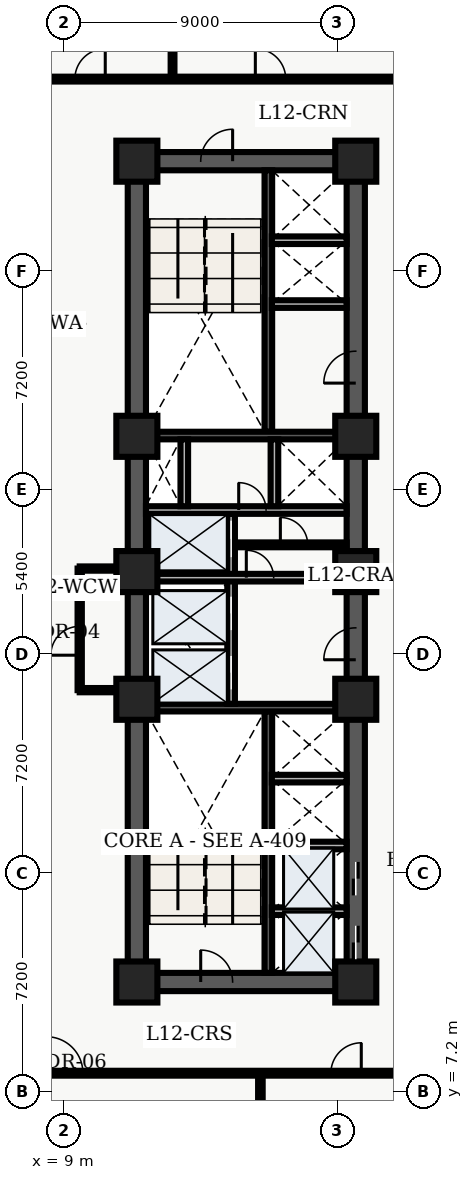
"""IFC4 building model, lengths in metres.
Left out: names, types, materials, properties, quantities, classifications, styles, units other than length and angle.
Written with IfcOpenShell. Run it as: python <this file> out.ifc"""

import sys

from ifc_helpers import new_model, entity, si_unit, converted_unit, direction, frame, origin_with_axes, origin_2d_with_axis, place, context, subcontext, project, spatial, polyline, rectangle, outline, extrude, element, fill, save


model = new_model("IFC4")
c1 = context("Model", 3, precision=1e-05, world=origin_with_axes(), true_north=direction((0.0, 1.0)))
c2 = subcontext(c1, "Body", "Model", "MODEL_VIEW")
j1 = project(units=[si_unit("LENGTHUNIT", "METRE"), converted_unit("PLANEANGLEUNIT", "DEGREE", entity("IfcPlaneAngleMeasure", 0.017), si_unit("PLANEANGLEUNIT", "RADIAN"), dimensions=[0, 0, 0, 0, 0, 0, 0])], contexts=[c1])
p1 = place(None, origin_with_axes())
s1 = spatial("IfcSite", under=j1, at=p1, CompositionType="ELEMENT")
p2 = place(p1, origin_with_axes())
s2 = spatial("IfcBuilding", under=s1, at=p2, CompositionType="ELEMENT")
p3 = place(p2, frame((0.0, 0.0, 52.2), z_axis=(0.0, 0.0, 1.0), x_axis=(1.0, 0.0, 0.0)))
s3 = spatial("IfcBuildingStorey", under=s2, at=p3, CompositionType="ELEMENT", Elevation=52.2)
p4 = place(p3, frame((11.4, 10.8, 0.0), z_axis=(0.0, 0.0, 1.0), x_axis=(0.0, 1.0, 0.0)))
e1 = element("IfcWall", 1, at=p4, inside=s3, PredefinedType="SHEAR", context=c2, shape_type="SweptSolid", body=[
    extrude(outline(polyline([(0.0, -0.3), (27.0, -0.3), (27.0, 0.3), (0.0, 0.3), (0.0, -0.3)])), origin_with_axes(), (0.0, 0.0, 1.0), 3.66),
])
p5 = place(p3, frame((11.4, 10.8, 0.0), z_axis=(0.0, 0.0, 1.0), x_axis=(1.0, 0.0, 0.0)))
e2 = element("IfcWall", 2, at=p5, inside=s3, PredefinedType="SHEAR", context=c2, shape_type="SweptSolid", body=[
    extrude(outline(polyline([(0.0, -0.3), (7.2, -0.3), (7.2, 0.3), (0.0, 0.3), (0.0, -0.3)])), origin_with_axes(), (0.0, 0.0, 1.0), 3.66),
])
p6 = place(p5, frame((2.625, 0.0, 0.0), z_axis=(0.0, 0.0, 1.0), x_axis=(1.0, 0.0, 0.0)))
e3 = element("IfcOpeningElement", 3, at=p6, cuts=e2, PredefinedType="OPENING", context=c2, shape_type="SweptSolid", body=[
    extrude(rectangle(XDim=1.05, YDim=0.62, at=origin_2d_with_axis()), origin_with_axes(), (0.0, 0.0, 1.0), 2.15),
])
p7 = place(p3, frame((11.4, 37.8, 0.0), z_axis=(0.0, 0.0, 1.0), x_axis=(1.0, 0.0, 0.0)))
e4 = element("IfcWall", 4, at=p7, inside=s3, PredefinedType="SHEAR", context=c2, shape_type="SweptSolid", body=[
    extrude(outline(polyline([(0.0, -0.3), (7.2, -0.3), (7.2, 0.3), (0.0, 0.3), (0.0, -0.3)])), origin_with_axes(), (0.0, 0.0, 1.0), 3.66),
])
p8 = place(p7, frame((2.625, 0.0, 0.0), z_axis=(0.0, 0.0, 1.0), x_axis=(1.0, 0.0, 0.0)))
e5 = element("IfcOpeningElement", 5, at=p8, cuts=e4, PredefinedType="OPENING", context=c2, shape_type="SweptSolid", body=[
    extrude(rectangle(XDim=1.05, YDim=0.62, at=origin_2d_with_axis()), origin_with_axes(), (0.0, 0.0, 1.0), 2.15),
])
p9 = place(p3, frame((18.6, 10.8, 0.0), z_axis=(0.0, 0.0, 1.0), x_axis=(0.0, 1.0, 0.0)))
e6 = element("IfcWall", 6, at=p9, inside=s3, PredefinedType="SHEAR", context=c2, shape_type="SweptSolid", body=[
    extrude(outline(polyline([(0.0, -0.3), (13.5, -0.3), (13.5, 0.3), (0.0, 0.3), (0.0, -0.3)])), origin_with_axes(), (0.0, 0.0, 1.0), 3.66),
])
p10 = place(p9, frame((1.3, 0.0, 0.0), z_axis=(0.0, 0.0, 1.0), x_axis=(1.0, 0.0, 0.0)))
e7 = element("IfcOpeningElement", 7, at=p10, cuts=e6, PredefinedType="OPENING", context=c2, shape_type="SweptSolid", body=[
    extrude(rectangle(XDim=1.1, YDim=0.62, at=origin_2d_with_axis()), origin_with_axes(), (0.0, 0.0, 1.0), 2.15),
])
p11 = place(p9, frame((3.4, 0.0, 0.0), z_axis=(0.0, 0.0, 1.0), x_axis=(1.0, 0.0, 0.0)))
e8 = element("IfcOpeningElement", 8, at=p11, cuts=e6, PredefinedType="OPENING", context=c2, shape_type="SweptSolid", body=[
    extrude(rectangle(XDim=1.1, YDim=0.62, at=origin_2d_with_axis()), origin_with_axes(), (0.0, 0.0, 1.0), 2.15),
])
p12 = place(p9, frame((11.125, 0.0, 0.0), z_axis=(0.0, 0.0, 1.0), x_axis=(1.0, 0.0, 0.0)))
e9 = element("IfcOpeningElement", 9, at=p12, cuts=e6, PredefinedType="OPENING", context=c2, shape_type="SweptSolid", body=[
    extrude(rectangle(XDim=1.05, YDim=0.62, at=origin_2d_with_axis()), origin_with_axes(), (0.0, 0.0, 1.0), 2.15),
])
p13 = place(p3, frame((18.6, 24.3, 0.0), z_axis=(0.0, 0.0, 1.0), x_axis=(0.0, 1.0, 0.0)))
e10 = element("IfcWall", 10, at=p13, inside=s3, PredefinedType="SHEAR", context=c2, shape_type="SweptSolid", body=[
    extrude(outline(polyline([(0.0, -0.3), (13.5, -0.3), (13.5, 0.3), (0.0, 0.3), (0.0, -0.3)])), origin_with_axes(), (0.0, 0.0, 1.0), 3.66),
])
p14 = place(p13, frame((6.725, 0.0, 0.0), z_axis=(0.0, 0.0, 1.0), x_axis=(1.0, 0.0, 0.0)))
e11 = element("IfcOpeningElement", 11, at=p14, cuts=e10, PredefinedType="OPENING", context=c2, shape_type="SweptSolid", body=[
    extrude(rectangle(XDim=1.05, YDim=0.62, at=origin_2d_with_axis()), origin_with_axes(), (0.0, 0.0, 1.0), 2.15),
])
p15 = place(p3, frame((15.725, 11.1, 0.0), z_axis=(0.0, 0.0, 1.0), x_axis=(0.0, 1.0, 0.0)))
e12 = element("IfcWall", 12, at=p15, inside=s3, PredefinedType="SHEAR", context=c2, shape_type="SweptSolid", body=[
    extrude(outline(polyline([(0.0, -0.125), (8.6, -0.125), (8.6, 0.125), (0.0, 0.125), (0.0, -0.125)])), origin_with_axes(), (0.0, 0.0, 1.0), 3.66),
])
p16 = place(p3, frame((11.7, 19.825, 0.0), z_axis=(0.0, 0.0, 1.0), x_axis=(1.0, 0.0, 0.0)))
e13 = element("IfcWall", 13, at=p16, inside=s3, PredefinedType="SHEAR", context=c2, shape_type="SweptSolid", body=[
    extrude(outline(polyline([(0.0, -0.125), (6.6, -0.125), (6.6, 0.125), (0.0, 0.125), (0.0, -0.125)])), origin_with_axes(), (0.0, 0.0, 1.0), 3.66),
])
p17 = place(p3, frame((15.725, 28.9, 0.0), z_axis=(0.0, 0.0, 1.0), x_axis=(0.0, 1.0, 0.0)))
e14 = element("IfcWall", 14, at=p17, inside=s3, PredefinedType="SHEAR", context=c2, shape_type="SweptSolid", body=[
    extrude(outline(polyline([(0.0, -0.125), (8.6, -0.125), (8.6, 0.125), (0.0, 0.125), (0.0, -0.125)])), origin_with_axes(), (0.0, 0.0, 1.0), 3.66),
])
p18 = place(p3, frame((11.7, 28.775, 0.0), z_axis=(0.0, 0.0, 1.0), x_axis=(1.0, 0.0, 0.0)))
e15 = element("IfcWall", 15, at=p18, inside=s3, PredefinedType="SHEAR", context=c2, shape_type="SweptSolid", body=[
    extrude(outline(polyline([(0.0, -0.125), (6.6, -0.125), (6.6, 0.125), (0.0, 0.125), (0.0, -0.125)])), origin_with_axes(), (0.0, 0.0, 1.0), 3.66),
])
p19 = place(p3, frame((14.5, 19.95, 0.0), z_axis=(0.0, 0.0, 1.0), x_axis=(0.0, 1.0, 0.0)))
e16 = element("IfcWall", 16, at=p19, inside=s3, PredefinedType="SOLIDWALL", context=c2, shape_type="SweptSolid", body=[
    extrude(outline(polyline([(0.0, -0.125), (6.25, -0.125), (6.25, 0.125), (0.0, 0.125), (0.0, -0.125)])), origin_with_axes(), (0.0, 0.0, 1.0), 2.7),
])
p20 = place(p19, frame((1.025, 0.0, 0.0), z_axis=(0.0, 0.0, 1.0), x_axis=(1.0, 0.0, 0.0)))
e17 = element("IfcOpeningElement", 17, at=p20, cuts=e16, PredefinedType="OPENING", context=c2, shape_type="SweptSolid", body=[
    extrude(rectangle(XDim=1.1, YDim=0.27, at=origin_2d_with_axis()), origin_with_axes(), (0.0, 0.0, 1.0), 2.15),
])
p21 = place(p19, frame((2.975, 0.0, 0.0), z_axis=(0.0, 0.0, 1.0), x_axis=(1.0, 0.0, 0.0)))
e18 = element("IfcOpeningElement", 18, at=p21, cuts=e16, PredefinedType="OPENING", context=c2, shape_type="SweptSolid", body=[
    extrude(rectangle(XDim=1.1, YDim=0.27, at=origin_2d_with_axis()), origin_with_axes(), (0.0, 0.0, 1.0), 2.15),
])
p22 = place(p19, frame((5.425, 0.0, 0.0), z_axis=(0.0, 0.0, 1.0), x_axis=(1.0, 0.0, 0.0)))
e19 = element("IfcOpeningElement", 19, at=p22, cuts=e16, PredefinedType="OPENING", context=c2, shape_type="SweptSolid", body=[
    extrude(rectangle(XDim=1.2, YDim=0.27, at=origin_2d_with_axis()), origin_with_axes(), (0.0, 0.0, 1.0), 2.15),
])
p23 = place(p3, frame((11.7, 24.1, 0.0), z_axis=(0.0, 0.0, 1.0), x_axis=(1.0, 0.0, 0.0)))
e20 = element("IfcWall", 20, at=p23, inside=s3, PredefinedType="SOLIDWALL", context=c2, shape_type="SweptSolid", body=[
    extrude(outline(polyline([(0.0, -0.125), (6.6, -0.125), (6.6, 0.125), (0.0, 0.125), (0.0, -0.125)])), origin_with_axes(), (0.0, 0.0, 1.0), 2.7),
])
p24 = place(p23, frame((3.75, 0.0, 0.0), z_axis=(0.0, 0.0, 1.0), x_axis=(1.0, 0.0, 0.0)))
e21 = element("IfcOpeningElement", 21, at=p24, cuts=e20, PredefinedType="OPENING", context=c2, shape_type="SweptSolid", body=[
    extrude(rectangle(XDim=0.9, YDim=0.27, at=origin_2d_with_axis()), origin_with_axes(), (0.0, 0.0, 1.0), 2.15),
])
p25 = place(p3, frame((11.7, 26.325, 0.0), z_axis=(0.0, 0.0, 1.0), x_axis=(1.0, 0.0, 0.0)))
e22 = element("IfcWall", 22, at=p25, inside=s3, PredefinedType="SOLIDWALL", context=c2, shape_type="SweptSolid", body=[
    extrude(outline(polyline([(0.0, -0.125), (6.6, -0.125), (6.6, 0.125), (0.0, 0.125), (0.0, -0.125)])), origin_with_axes(), (0.0, 0.0, 1.0), 2.7),
])
p26 = place(p25, frame((3.5, 0.0, 0.0), z_axis=(0.0, 0.0, 1.0), x_axis=(1.0, 0.0, 0.0)))
e23 = element("IfcOpeningElement", 23, at=p26, cuts=e22, PredefinedType="OPENING", context=c2, shape_type="SweptSolid", body=[
    extrude(rectangle(XDim=0.9, YDim=0.27, at=origin_2d_with_axis()), origin_with_axes(), (0.0, 0.0, 1.0), 2.15),
])
for number, where, z_axis, x_axis in (
    (24, (12.96, 26.45, 0.0), (0.0, 0.0, 1.0), (0.0, 1.0, 0.0)),
    (25, (15.925, 26.45, 0.0), (0.0, 0.0, 1.0), (0.0, 1.0, 0.0)),
):
    element("IfcWall", number, at=place(p3, frame(where, z_axis=z_axis, x_axis=x_axis)), inside=s3, PredefinedType="SOLIDWALL", context=c2, shape_type="SweptSolid", body=[
        extrude(outline(polyline([(0.0, -0.125), (2.2, -0.125), (2.2, 0.125), (0.0, 0.125), (0.0, -0.125)])), origin_with_axes(), (0.0, 0.0, 1.0), 2.7),
    ])
for number, where, z_axis, x_axis in (
    (26, (11.4, 10.8, 0.0), (0.0, 0.0, 1.0), (1.0, 0.0, 0.0)),
    (27, (11.4, 20.1, 0.0), (0.0, 0.0, 1.0), (1.0, 0.0, 0.0)),
    (28, (11.4, 24.3, 0.0), (0.0, 0.0, 1.0), (1.0, 0.0, 0.0)),
    (29, (11.4, 28.75, 0.0), (0.0, 0.0, 1.0), (1.0, 0.0, 0.0)),
    (30, (11.4, 37.8, 0.0), (0.0, 0.0, 1.0), (1.0, 0.0, 0.0)),
    (31, (18.6, 10.8, 0.0), (0.0, 0.0, 1.0), (1.0, 0.0, 0.0)),
    (32, (18.6, 20.1, 0.0), (0.0, 0.0, 1.0), (1.0, 0.0, 0.0)),
    (33, (18.6, 24.3, 0.0), (0.0, 0.0, 1.0), (1.0, 0.0, 0.0)),
    (34, (18.6, 28.75, 0.0), (0.0, 0.0, 1.0), (1.0, 0.0, 0.0)),
    (35, (18.6, 37.8, 0.0), (0.0, 0.0, 1.0), (1.0, 0.0, 0.0)),
):
    element("IfcColumn", number, at=place(p3, frame(where, z_axis=z_axis, x_axis=x_axis)), inside=s3, PredefinedType="COLUMN", context=c2, shape_type="SweptSolid", body=[
        extrude(rectangle(XDim=1.35, YDim=1.35, at=origin_2d_with_axis()), origin_with_axes(), (0.0, 0.0, 1.0), 3.9),
    ])
p27 = place(p3, frame((14.62, 25.18, 0.0), z_axis=(0.0, 0.0, 1.0), x_axis=(1.0, 0.0, 0.0)))
e36 = element("IfcWall", 36, at=p27, inside=s3, PredefinedType="PARTITIONING", context=c2, shape_type="SweptSolid", body=[
    extrude(outline(polyline([(0.0, -0.08), (3.68, -0.08), (3.68, 0.08), (0.0, 0.08), (0.0, -0.08)])), origin_with_axes(), (0.0, 0.0, 1.0), 2.7),
])
p28 = place(p27, frame((1.95, 0.0, 0.0), z_axis=(0.0, 0.0, 1.0), x_axis=(1.0, 0.0, 0.0)))
e37 = element("IfcOpeningElement", 37, at=p28, cuts=e36, PredefinedType="OPENING", context=c2, shape_type="SweptSolid", body=[
    extrude(rectangle(XDim=0.9, YDim=0.18, at=origin_2d_with_axis()), origin_with_axes(), (0.0, 0.0, 1.0), 2.15),
])
for number, where, z_axis, x_axis in (
    (38, (15.84, 13.13, 0.0), (0.0, 0.0, 1.0), (1.0, 0.0, 0.0)),
    (39, (15.84, 15.29, 0.0), (0.0, 0.0, 1.0), (1.0, 0.0, 0.0)),
    (40, (15.84, 17.49, 0.0), (0.0, 0.0, 1.0), (1.0, 0.0, 0.0)),
    (41, (15.84, 33.1, 0.0), (0.0, 0.0, 1.0), (1.0, 0.0, 0.0)),
    (42, (15.84, 35.2, 0.0), (0.0, 0.0, 1.0), (1.0, 0.0, 0.0)),
):
    element("IfcWall", number, at=place(p3, frame(where, z_axis=z_axis, x_axis=x_axis)), inside=s3, PredefinedType="SOLIDWALL", context=c2, shape_type="SweptSolid", body=[
        extrude(outline(polyline([(0.0, -0.125), (2.46, -0.125), (2.46, 0.125), (0.0, 0.125), (0.0, -0.125)])), origin_with_axes(), (0.0, 0.0, 1.0), 2.7),
    ])
p29 = place(p3, frame((9.52, 20.4, 0.0), z_axis=(0.0, 0.0, 1.0), x_axis=(0.0, 1.0, 0.0)))
e43 = element("IfcWall", 43, at=p29, inside=s3, PredefinedType="PARTITIONING", context=c2, shape_type="SweptSolid", body=[
    extrude(outline(polyline([(0.0, -0.07), (4.0, -0.07), (4.0, 0.07), (0.0, 0.07), (0.0, -0.07)])), origin_with_axes(), (0.0, 0.0, 1.0), 2.7),
])
p30 = place(p29, frame((1.625, 0.0, 0.0), z_axis=(0.0, 0.0, 1.0), x_axis=(1.0, 0.0, 0.0)))
e44 = element("IfcOpeningElement", 44, at=p30, cuts=e43, PredefinedType="OPENING", context=c2, shape_type="SweptSolid", body=[
    extrude(rectangle(XDim=0.95, YDim=0.16, at=origin_2d_with_axis()), origin_with_axes(), (0.0, 0.0, 1.0), 2.15),
])
for number, where, z_axis, x_axis in (
    (45, (9.52, 20.4, 0.0), (0.0, 0.0, 1.0), (1.0, 0.0, 0.0)),
    (46, (9.52, 24.4, 0.0), (0.0, 0.0, 1.0), (1.0, 0.0, 0.0)),
):
    element("IfcWall", number, at=place(p3, frame(where, z_axis=z_axis, x_axis=x_axis)), inside=s3, PredefinedType="PARTITIONING", context=c2, shape_type="SweptSolid", body=[
        extrude(outline(polyline([(0.0, -0.07), (1.58, -0.07), (1.58, 0.07), (0.0, 0.07), (0.0, -0.07)])), origin_with_axes(), (0.0, 0.0, 1.0), 2.7),
    ])
p31 = place(p3, frame((2.6, 7.8, 0.0), z_axis=(0.0, 0.0, 1.0), x_axis=(1.0, 0.0, 0.0)))
e47 = element("IfcWall", 47, at=p31, inside=s3, PredefinedType="PARTITIONING", context=c2, shape_type="SweptSolid", body=[
    extrude(outline(polyline([(0.0, -0.08), (18.55, -0.08), (18.55, 0.08), (0.0, 0.08), (0.0, -0.08)])), origin_with_axes(), (0.0, 0.0, 1.0), 2.7),
])
p32 = place(p31, frame((6.426, 0.0, 0.0), z_axis=(0.0, 0.0, 1.0), x_axis=(1.0, 0.0, 0.0)))
e48 = element("IfcOpeningElement", 48, at=p32, cuts=e47, PredefinedType="OPENING", context=c2, shape_type="SweptSolid", body=[
    extrude(rectangle(XDim=1.2, YDim=0.18, at=origin_2d_with_axis()), origin_with_axes(), (0.0, 0.0, 1.0), 2.2),
])
p33 = place(p31, frame((15.681, 0.0, 0.0), z_axis=(0.0, 0.0, 1.0), x_axis=(1.0, 0.0, 0.0)))
e49 = element("IfcOpeningElement", 49, at=p33, cuts=e47, PredefinedType="OPENING", context=c2, shape_type="SweptSolid", body=[
    extrude(rectangle(XDim=1.0, YDim=0.18, at=origin_2d_with_axis()), origin_with_axes(), (0.0, 0.0, 1.0), 2.15),
])
p34 = place(p3, frame((2.6, 40.5, 0.0), z_axis=(0.0, 0.0, 1.0), x_axis=(1.0, 0.0, 0.0)))
e50 = element("IfcWall", 50, at=p34, inside=s3, PredefinedType="PARTITIONING", context=c2, shape_type="SweptSolid", body=[
    extrude(outline(polyline([(0.0, -0.08), (18.65, -0.08), (18.65, 0.08), (0.0, 0.08), (0.0, -0.08)])), origin_with_axes(), (0.0, 0.0, 1.0), 2.7),
])
p35 = place(p34, frame((2.268, 0.0, 0.0), z_axis=(0.0, 0.0, 1.0), x_axis=(1.0, 0.0, 0.0)))
e51 = element("IfcOpeningElement", 51, at=p35, cuts=e50, PredefinedType="OPENING", context=c2, shape_type="SweptSolid", body=[
    extrude(rectangle(XDim=1.0, YDim=0.18, at=origin_2d_with_axis()), origin_with_axes(), (0.0, 0.0, 1.0), 2.15),
])
p36 = place(p34, frame((7.261, 0.0, 0.0), z_axis=(0.0, 0.0, 1.0), x_axis=(1.0, 0.0, 0.0)))
e52 = element("IfcOpeningElement", 52, at=p36, cuts=e50, PredefinedType="OPENING", context=c2, shape_type="SweptSolid", body=[
    extrude(rectangle(XDim=1.0, YDim=0.18, at=origin_2d_with_axis()), origin_with_axes(), (0.0, 0.0, 1.0), 2.15),
])
p37 = place(p34, frame((13.197, 0.0, 0.0), z_axis=(0.0, 0.0, 1.0), x_axis=(1.0, 0.0, 0.0)))
e53 = element("IfcOpeningElement", 53, at=p37, cuts=e50, PredefinedType="OPENING", context=c2, shape_type="SweptSolid", body=[
    extrude(rectangle(XDim=1.0, YDim=0.18, at=origin_2d_with_axis()), origin_with_axes(), (0.0, 0.0, 1.0), 2.15),
])
p38 = place(p3, frame((15.463, 0.36, 0.0), z_axis=(0.0, 0.0, 1.0), x_axis=(0.0, 1.0, 0.0)))
e54 = element("IfcWall", 54, at=p38, inside=s3, PredefinedType="PARTITIONING", context=c2, shape_type="SweptSolid", body=[
    extrude(outline(polyline([(0.0, -0.075), (7.34, -0.075), (7.34, 0.075), (0.0, 0.075), (0.0, -0.075)])), origin_with_axes(), (0.0, 0.0, 1.0), 2.7),
])
p39 = place(p3, frame((12.574, 40.6, 0.0), z_axis=(0.0, 0.0, 1.0), x_axis=(0.0, 1.0, 0.0)))
e55 = element("IfcWall", 55, at=p39, inside=s3, PredefinedType="PARTITIONING", context=c2, shape_type="SweptSolid", body=[
    extrude(outline(polyline([(0.0, -0.062), (7.64, -0.062), (7.64, 0.062), (0.0, 0.062), (0.0, -0.062)])), origin_with_axes(), (0.0, 0.0, 1.0), 2.7),
])
p40 = place(p9, frame((1.3, 0.0, 0.0), z_axis=(0.0, 0.0, 1.0), x_axis=(1.0, 0.0, 0.0)))
e56 = element("IfcDoor", 56, at=p40, inside=s3, OperationType="SLIDING_TO_LEFT", PredefinedType="DOOR", context=c2, shape_type="SweptSolid", body=[
    extrude(rectangle(XDim=1.1, YDim=0.09, at=origin_2d_with_axis()), origin_with_axes(), (0.0, 0.0, 1.0), 2.15),
])
fill(e7, e56)
p41 = place(p9, frame((3.4, 0.0, 0.0), z_axis=(0.0, 0.0, 1.0), x_axis=(1.0, 0.0, 0.0)))
e57 = element("IfcDoor", 57, at=p41, inside=s3, OperationType="SLIDING_TO_RIGHT", PredefinedType="DOOR", context=c2, shape_type="SweptSolid", body=[
    extrude(rectangle(XDim=1.1, YDim=0.09, at=origin_2d_with_axis()), origin_with_axes(), (0.0, 0.0, 1.0), 2.15),
])
fill(e8, e57)
p42 = place(p19, frame((1.025, 0.0, 0.0), z_axis=(0.0, 0.0, 1.0), x_axis=(1.0, 0.0, 0.0)))
e58 = element("IfcDoor", 58, at=p42, inside=s3, OperationType="SLIDING_TO_LEFT", PredefinedType="DOOR", context=c2, shape_type="SweptSolid", body=[
    extrude(rectangle(XDim=1.1, YDim=0.09, at=origin_2d_with_axis()), origin_with_axes(), (0.0, 0.0, 1.0), 2.15),
])
fill(e17, e58)
p43 = place(p19, frame((2.975, 0.0, 0.0), z_axis=(0.0, 0.0, 1.0), x_axis=(1.0, 0.0, 0.0)))
e59 = element("IfcDoor", 59, at=p43, inside=s3, OperationType="SLIDING_TO_RIGHT", PredefinedType="DOOR", context=c2, shape_type="SweptSolid", body=[
    extrude(rectangle(XDim=1.1, YDim=0.09, at=origin_2d_with_axis()), origin_with_axes(), (0.0, 0.0, 1.0), 2.15),
])
fill(e18, e59)
p44 = place(p19, frame((5.425, 0.0, 0.0), z_axis=(0.0, 0.0, 1.0), x_axis=(1.0, 0.0, 0.0)))
e60 = element("IfcDoor", 60, at=p44, inside=s3, OperationType="DOUBLE_DOOR_SLIDING", PredefinedType="DOOR", context=c2, shape_type="SweptSolid", body=[
    extrude(rectangle(XDim=1.2, YDim=0.09, at=origin_2d_with_axis()), origin_with_axes(), (0.0, 0.0, 1.0), 2.15),
])
fill(e19, e60)
p45 = place(p5, frame((2.625, 0.0, 0.0), z_axis=(0.0, 0.0, 1.0), x_axis=(1.0, 0.0, 0.0)))
e61 = element("IfcDoor", 61, at=p45, inside=s3, OperationType="SINGLE_SWING_LEFT", PredefinedType="DOOR", context=c2, shape_type="SweptSolid", body=[
    extrude(rectangle(XDim=1.05, YDim=0.09, at=origin_2d_with_axis()), origin_with_axes(), (0.0, 0.0, 1.0), 2.15),
])
fill(e3, e61)
p46 = place(p7, frame((2.625, 0.0, 0.0), z_axis=(0.0, 0.0, 1.0), x_axis=(1.0, 0.0, 0.0)))
e62 = element("IfcDoor", 62, at=p46, inside=s3, OperationType="SINGLE_SWING_RIGHT", PredefinedType="DOOR", context=c2, shape_type="SweptSolid", body=[
    extrude(rectangle(XDim=1.05, YDim=0.09, at=origin_2d_with_axis()), origin_with_axes(), (0.0, 0.0, 1.0), 2.15),
])
fill(e5, e62)
p47 = place(p9, frame((11.125, 0.0, 0.0), z_axis=(0.0, 0.0, 1.0), x_axis=(1.0, 0.0, 0.0)))
e63 = element("IfcDoor", 63, at=p47, inside=s3, OperationType="SINGLE_SWING_LEFT", PredefinedType="DOOR", context=c2, shape_type="SweptSolid", body=[
    extrude(rectangle(XDim=1.05, YDim=0.09, at=origin_2d_with_axis()), origin_with_axes(), (0.0, 0.0, 1.0), 2.15),
])
fill(e9, e63)
p48 = place(p25, frame((3.5, 0.0, 0.0), z_axis=(0.0, 0.0, 1.0), x_axis=(1.0, 0.0, 0.0)))
e64 = element("IfcDoor", 64, at=p48, inside=s3, OperationType="SINGLE_SWING_LEFT", PredefinedType="DOOR", context=c2, shape_type="SweptSolid", body=[
    extrude(rectangle(XDim=0.9, YDim=0.09, at=origin_2d_with_axis()), origin_with_axes(), (0.0, 0.0, 1.0), 2.15),
])
fill(e23, e64)
p49 = place(p23, frame((3.75, 0.0, 0.0), z_axis=(0.0, 0.0, 1.0), x_axis=(1.0, 0.0, 0.0)))
e65 = element("IfcDoor", 65, at=p49, inside=s3, OperationType="SINGLE_SWING_LEFT", PredefinedType="DOOR", context=c2, shape_type="SweptSolid", body=[
    extrude(rectangle(XDim=0.9, YDim=0.09, at=origin_2d_with_axis()), origin_with_axes(), (0.0, 0.0, 1.0), 2.15),
])
fill(e21, e65)
p50 = place(p27, frame((1.95, 0.0, 0.0), z_axis=(0.0, 0.0, 1.0), x_axis=(1.0, 0.0, 0.0)))
e66 = element("IfcDoor", 66, at=p50, inside=s3, OperationType="SINGLE_SWING_LEFT", PredefinedType="DOOR", context=c2, shape_type="SweptSolid", body=[
    extrude(rectangle(XDim=0.9, YDim=0.09, at=origin_2d_with_axis()), origin_with_axes(), (0.0, 0.0, 1.0), 2.15),
])
fill(e37, e66)
p51 = place(p13, frame((6.725, 0.0, 0.0), z_axis=(0.0, 0.0, 1.0), x_axis=(1.0, 0.0, 0.0)))
e67 = element("IfcDoor", 67, at=p51, inside=s3, OperationType="SINGLE_SWING_LEFT", PredefinedType="DOOR", context=c2, shape_type="SweptSolid", body=[
    extrude(rectangle(XDim=1.05, YDim=0.09, at=origin_2d_with_axis()), origin_with_axes(), (0.0, 0.0, 1.0), 2.15),
])
fill(e11, e67)
p52 = place(p29, frame((1.625, 0.0, 0.0), z_axis=(0.0, 0.0, 1.0), x_axis=(1.0, 0.0, 0.0)))
e68 = element("IfcDoor", 68, at=p52, inside=s3, OperationType="SINGLE_SWING_LEFT", PredefinedType="DOOR", context=c2, shape_type="SweptSolid", body=[
    extrude(rectangle(XDim=0.95, YDim=0.084, at=origin_2d_with_axis()), origin_with_axes(), (0.0, 0.0, 1.0), 2.15),
])
fill(e44, e68)
p53 = place(p31, frame((6.426, 0.0, 0.0), z_axis=(0.0, 0.0, 1.0), x_axis=(1.0, 0.0, 0.0)))
e69 = element("IfcDoor", 69, at=p53, inside=s3, OperationType="SINGLE_SWING_LEFT", PredefinedType="DOOR", context=c2, shape_type="SweptSolid", body=[
    extrude(rectangle(XDim=1.2, YDim=0.09, at=origin_2d_with_axis()), origin_with_axes(), (0.0, 0.0, 1.0), 2.2),
])
fill(e48, e69)
p54 = place(p31, frame((15.681, 0.0, 0.0), z_axis=(0.0, 0.0, 1.0), x_axis=(1.0, 0.0, 0.0)))
e70 = element("IfcDoor", 70, at=p54, inside=s3, OperationType="SINGLE_SWING_RIGHT", PredefinedType="DOOR", context=c2, shape_type="SweptSolid", body=[
    extrude(rectangle(XDim=1.0, YDim=0.09, at=origin_2d_with_axis()), origin_with_axes(), (0.0, 0.0, 1.0), 2.15),
])
fill(e49, e70)
p55 = place(p34, frame((7.261, 0.0, 0.0), z_axis=(0.0, 0.0, 1.0), x_axis=(1.0, 0.0, 0.0)))
e71 = element("IfcDoor", 71, at=p55, inside=s3, OperationType="SINGLE_SWING_RIGHT", PredefinedType="DOOR", context=c2, shape_type="SweptSolid", body=[
    extrude(rectangle(XDim=1.0, YDim=0.09, at=origin_2d_with_axis()), origin_with_axes(), (0.0, 0.0, 1.0), 2.15),
])
fill(e52, e71)
p56 = place(p34, frame((13.197, 0.0, 0.0), z_axis=(0.0, 0.0, 1.0), x_axis=(1.0, 0.0, 0.0)))
e72 = element("IfcDoor", 72, at=p56, inside=s3, OperationType="SINGLE_SWING_LEFT", PredefinedType="DOOR", context=c2, shape_type="SweptSolid", body=[
    extrude(rectangle(XDim=1.0, YDim=0.09, at=origin_2d_with_axis()), origin_with_axes(), (0.0, 0.0, 1.0), 2.15),
])
fill(e53, e72)
save(model, sys.argv[1])
